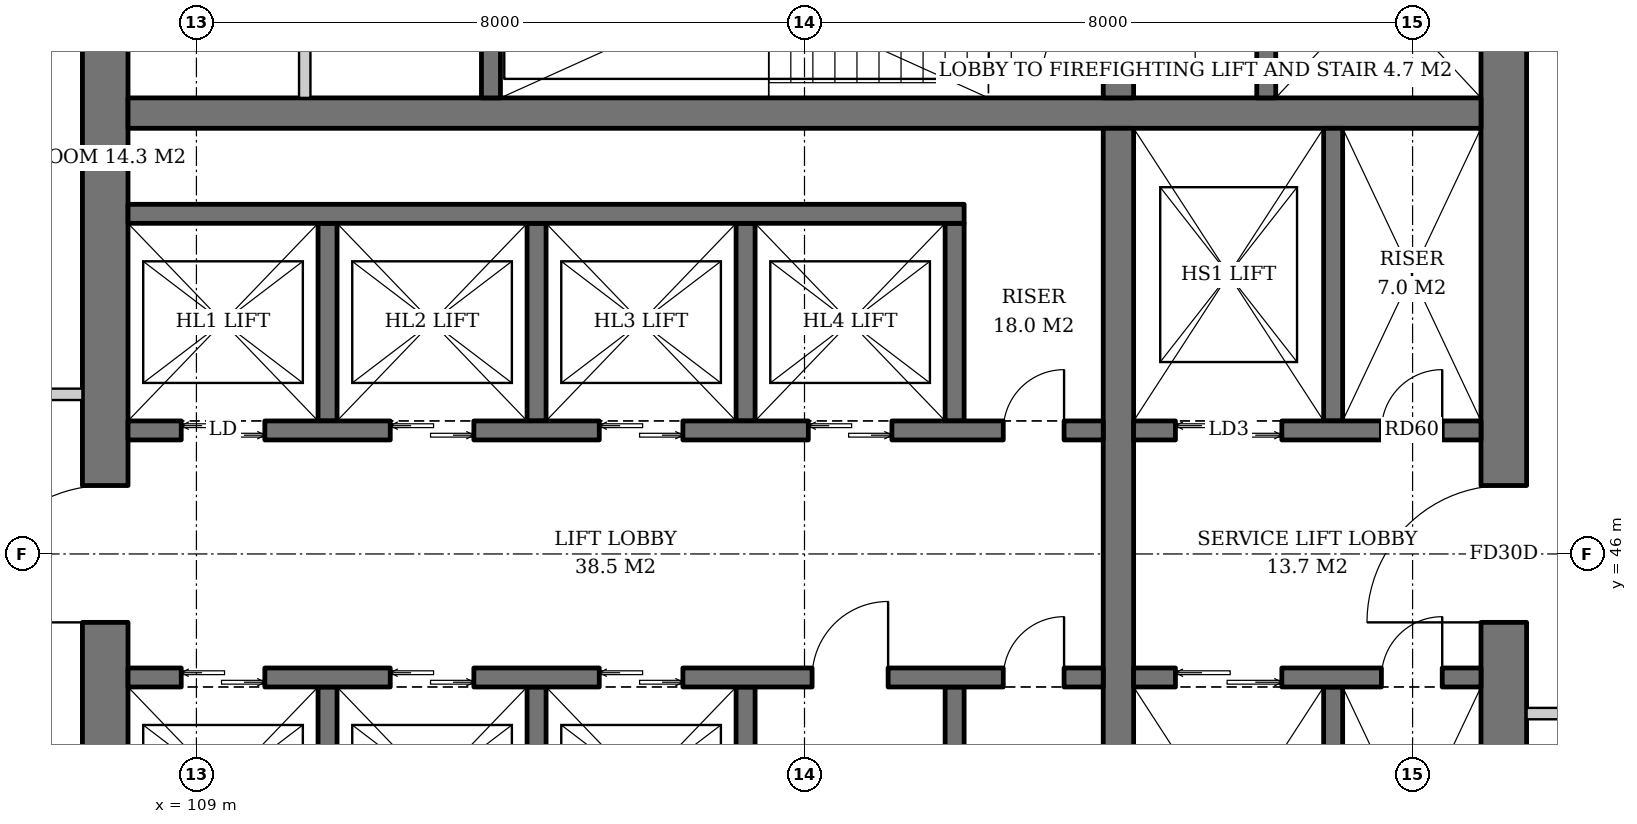
"""IFC4 building model, lengths in metres.
Left out: names, types, materials, properties, quantities, classifications, styles, units other than length and angle.
Written with IfcOpenShell. Run it as: python <this file> out.ifc"""

import sys

from ifc_helpers import new_model, si_unit, direction, frame, frame_2d, origin, place, context, subcontext, project, spatial, rectangle, extrude, element, fill, save


model = new_model("IFC4")
c1 = context("Model", 3, precision=1e-05, world=origin(), true_north=direction((0.0, 1.0)))
c2 = subcontext(c1, "Body", "Model", "MODEL_VIEW")
j1 = project(units=[si_unit("LENGTHUNIT", "METRE"), si_unit("PLANEANGLEUNIT", "RADIAN")], contexts=[c1])
p1 = place(None, origin())
s1 = spatial("IfcSite", under=j1, at=p1, CompositionType="ELEMENT")
p2 = place(p1, origin())
s2 = spatial("IfcBuilding", under=s1, at=p2, CompositionType="ELEMENT")
p3 = place(p2, frame((0.0, 0.0, 40.0)))
s3 = spatial("IfcBuildingStorey", under=s2, at=p3, CompositionType="ELEMENT", Elevation=40.0)
p4 = place(p3, frame((107.8, 37.1, 0.0), z_axis=(0.0, 0.0, 1.0), x_axis=(0.0, 1.0, 0.0)))
e1 = element("IfcWall", 1, at=p4, inside=s3, PredefinedType="SHEAR", context=c2, shape_type="SweptSolid", body=[
    extrude(rectangle(XDim=17.8, YDim=0.6, at=frame_2d((8.9, 0.0))), origin(), (0.0, 0.0, 1.0), 3.8),
])
p5 = place(p4, frame((8.0, 0.0, 0.0)))
e2 = element("IfcOpeningElement", 2, at=p5, cuts=e1, PredefinedType="OPENING", context=c2, shape_type="SweptSolid", body=[
    extrude(rectangle(XDim=1.8, YDim=2.4, at=frame_2d((0.9, 1.2))), frame((0.0, 0.31, 0.0), z_axis=(0.0, -1.0, 0.0), x_axis=(1.0, 0.0, 0.0)), (0.0, 0.0, 1.0), 0.62),
])
p6 = place(p3, frame((126.2, 37.1, 0.0), z_axis=(0.0, 0.0, 1.0), x_axis=(0.0, 1.0, 0.0)))
e3 = element("IfcWall", 3, at=p6, inside=s3, PredefinedType="SHEAR", context=c2, shape_type="SweptSolid", body=[
    extrude(rectangle(XDim=17.8, YDim=0.6, at=frame_2d((8.9, 0.0))), origin(), (0.0, 0.0, 1.0), 3.8),
])
p7 = place(p6, frame((8.0, 0.0, 0.0)))
e4 = element("IfcOpeningElement", 4, at=p7, cuts=e3, PredefinedType="OPENING", context=c2, shape_type="SweptSolid", body=[
    extrude(rectangle(XDim=1.8, YDim=2.4, at=frame_2d((0.9, 1.2))), frame((0.0, 0.31, 0.0), z_axis=(0.0, -1.0, 0.0), x_axis=(1.0, 0.0, 0.0)), (0.0, 0.0, 1.0), 0.62),
])
p8 = place(p3, frame((108.1, 51.8, 0.0), z_axis=(0.0, 0.0, 1.0), x_axis=(1.0, 0.0, 0.0)))
e5 = element("IfcWall", 5, at=p8, inside=s3, PredefinedType="SHEAR", context=c2, shape_type="SweptSolid", body=[
    extrude(rectangle(XDim=17.8, YDim=0.4, at=frame_2d((8.9, 0.0))), origin(), (0.0, 0.0, 1.0), 3.8),
])
p9 = place(p3, frame((121.13, 40.4, 0.0), z_axis=(0.0, 0.0, 1.0), x_axis=(0.0, 1.0, 0.0)))
e6 = element("IfcWall", 6, at=p9, inside=s3, PredefinedType="SHEAR", context=c2, shape_type="SweptSolid", body=[
    extrude(rectangle(XDim=11.2, YDim=0.4, at=frame_2d((5.6, 0.0))), origin(), (0.0, 0.0, 1.0), 3.8),
])
p10 = place(p3, frame((121.13, 52.0, 0.0), z_axis=(0.0, 0.0, 1.0), x_axis=(0.0, 1.0, 0.0)))
e7 = element("IfcWall", 7, at=p10, inside=s3, PredefinedType="SHEAR", context=c2, shape_type="SweptSolid", body=[
    extrude(rectangle(XDim=2.9, YDim=0.4, at=frame_2d((1.45, 0.0))), origin(), (0.0, 0.0, 1.0), 3.8),
])
p11 = place(p10, frame((0.3, 0.0, 0.0)))
e8 = element("IfcOpeningElement", 8, at=p11, cuts=e7, PredefinedType="OPENING", context=c2, shape_type="SweptSolid", body=[
    extrude(rectangle(XDim=1.0, YDim=2.1, at=frame_2d((0.5, 1.05))), frame((0.0, 0.21, 0.0), z_axis=(0.0, -1.0, 0.0), x_axis=(1.0, 0.0, 0.0)), (0.0, 0.0, 1.0), 0.42),
])
p12 = place(p3, frame((112.875, 52.0, 0.0), z_axis=(0.0, 0.0, 1.0), x_axis=(0.0, 1.0, 0.0)))
e9 = element("IfcWall", 9, at=p12, inside=s3, PredefinedType="SHEAR", context=c2, shape_type="SweptSolid", body=[
    extrude(rectangle(XDim=2.9, YDim=0.25, at=frame_2d((1.45, 0.0))), origin(), (0.0, 0.0, 1.0), 3.8),
])
p13 = place(p3, frame((123.075, 52.0, 0.0), z_axis=(0.0, 0.0, 1.0), x_axis=(0.0, 1.0, 0.0)))
e10 = element("IfcWall", 10, at=p13, inside=s3, PredefinedType="SHEAR", context=c2, shape_type="SweptSolid", body=[
    extrude(rectangle(XDim=2.9, YDim=0.25, at=frame_2d((1.45, 0.0))), origin(), (0.0, 0.0, 1.0), 3.8),
])
p14 = place(p13, frame((0.8, 0.0, 0.0)))
e11 = element("IfcOpeningElement", 11, at=p14, cuts=e10, PredefinedType="OPENING", context=c2, shape_type="SweptSolid", body=[
    extrude(rectangle(XDim=1.3, YDim=2.2, at=frame_2d((0.65, 1.1))), frame((0.0, 0.135, 0.0), z_axis=(0.0, -1.0, 0.0), x_axis=(1.0, 0.0, 0.0)), (0.0, 0.0, 1.0), 0.27),
])
for number, where, z_axis, x_axis in (
    (12, (110.725, 47.75, 0.0), (0.0, 0.0, 1.0), (0.0, 1.0, 0.0)),
    (13, (113.475, 47.75, 0.0), (0.0, 0.0, 1.0), (0.0, 1.0, 0.0)),
    (14, (116.225, 47.75, 0.0), (0.0, 0.0, 1.0), (0.0, 1.0, 0.0)),
    (15, (118.975, 47.75, 0.0), (0.0, 0.0, 1.0), (0.0, 1.0, 0.0)),
):
    element("IfcWall", number, at=place(p3, frame(where, z_axis=z_axis, x_axis=x_axis)), inside=s3, PredefinedType="SHEAR", context=c2, shape_type="SweptSolid", body=[
        extrude(rectangle(XDim=2.6, YDim=0.25, at=frame_2d((1.3, 0.0))), origin(), (0.0, 0.0, 1.0), 3.8),
    ])
p15 = place(p3, frame((108.1, 50.475, 0.0), z_axis=(0.0, 0.0, 1.0), x_axis=(1.0, 0.0, 0.0)))
e16 = element("IfcWall", 16, at=p15, inside=s3, PredefinedType="SHEAR", context=c2, shape_type="SweptSolid", body=[
    extrude(rectangle(XDim=11.0, YDim=0.25, at=frame_2d((5.5, 0.0))), origin(), (0.0, 0.0, 1.0), 3.8),
])
p16 = place(p3, frame((108.1, 47.625, 0.0), z_axis=(0.0, 0.0, 1.0), x_axis=(1.0, 0.0, 0.0)))
e17 = element("IfcWall", 17, at=p16, inside=s3, PredefinedType="SHEAR", context=c2, shape_type="SweptSolid", body=[
    extrude(rectangle(XDim=12.83, YDim=0.25, at=frame_2d((6.415, 0.0))), origin(), (0.0, 0.0, 1.0), 3.8),
])
p17 = place(p16, frame((0.7, 0.0, 0.0)))
e18 = element("IfcOpeningElement", 18, at=p17, cuts=e17, PredefinedType="OPENING", context=c2, shape_type="SweptSolid", body=[
    extrude(rectangle(XDim=1.1, YDim=2.2, at=frame_2d((0.55, 1.1))), frame((0.0, 0.135, 0.0), z_axis=(0.0, -1.0, 0.0), x_axis=(1.0, 0.0, 0.0)), (0.0, 0.0, 1.0), 0.27),
])
p18 = place(p16, frame((3.45, 0.0, 0.0)))
e19 = element("IfcOpeningElement", 19, at=p18, cuts=e17, PredefinedType="OPENING", context=c2, shape_type="SweptSolid", body=[
    extrude(rectangle(XDim=1.1, YDim=2.2, at=frame_2d((0.55, 1.1))), frame((0.0, 0.135, 0.0), z_axis=(0.0, -1.0, 0.0), x_axis=(1.0, 0.0, 0.0)), (0.0, 0.0, 1.0), 0.27),
])
p19 = place(p16, frame((6.2, 0.0, 0.0)))
e20 = element("IfcOpeningElement", 20, at=p19, cuts=e17, PredefinedType="OPENING", context=c2, shape_type="SweptSolid", body=[
    extrude(rectangle(XDim=1.1, YDim=2.2, at=frame_2d((0.55, 1.1))), frame((0.0, 0.135, 0.0), z_axis=(0.0, -1.0, 0.0), x_axis=(1.0, 0.0, 0.0)), (0.0, 0.0, 1.0), 0.27),
])
p20 = place(p16, frame((8.95, 0.0, 0.0)))
e21 = element("IfcOpeningElement", 21, at=p20, cuts=e17, PredefinedType="OPENING", context=c2, shape_type="SweptSolid", body=[
    extrude(rectangle(XDim=1.1, YDim=2.2, at=frame_2d((0.55, 1.1))), frame((0.0, 0.135, 0.0), z_axis=(0.0, -1.0, 0.0), x_axis=(1.0, 0.0, 0.0)), (0.0, 0.0, 1.0), 0.27),
])
p21 = place(p16, frame((11.515, 0.0, 0.0)))
e22 = element("IfcOpeningElement", 22, at=p21, cuts=e17, PredefinedType="OPENING", context=c2, shape_type="SweptSolid", body=[
    extrude(rectangle(XDim=0.8, YDim=2.0, at=frame_2d((0.4, 1.0))), frame((0.0, 0.135, 0.0), z_axis=(0.0, -1.0, 0.0), x_axis=(1.0, 0.0, 0.0)), (0.0, 0.0, 1.0), 0.27),
])
for number, where, z_axis, x_axis in (
    (23, (110.725, 44.25, 0.0), (0.0, 0.0, 1.0), (0.0, -1.0, 0.0)),
    (24, (113.475, 44.25, 0.0), (0.0, 0.0, 1.0), (0.0, -1.0, 0.0)),
    (25, (116.225, 44.25, 0.0), (0.0, 0.0, 1.0), (0.0, -1.0, 0.0)),
    (26, (118.975, 44.25, 0.0), (0.0, 0.0, 1.0), (0.0, -1.0, 0.0)),
):
    element("IfcWall", number, at=place(p3, frame(where, z_axis=z_axis, x_axis=x_axis)), inside=s3, PredefinedType="SHEAR", context=c2, shape_type="SweptSolid", body=[
        extrude(rectangle(XDim=2.6, YDim=0.25, at=frame_2d((1.3, 0.0))), origin(), (0.0, 0.0, 1.0), 3.8),
    ])
p22 = place(p3, frame((108.1, 44.375, 0.0), z_axis=(0.0, 0.0, 1.0), x_axis=(1.0, 0.0, 0.0)))
e27 = element("IfcWall", 27, at=p22, inside=s3, PredefinedType="SHEAR", context=c2, shape_type="SweptSolid", body=[
    extrude(rectangle(XDim=12.83, YDim=0.25, at=frame_2d((6.415, 0.0))), origin(), (0.0, 0.0, 1.0), 3.8),
])
p23 = place(p22, frame((0.7, 0.0, 0.0)))
e28 = element("IfcOpeningElement", 28, at=p23, cuts=e27, PredefinedType="OPENING", context=c2, shape_type="SweptSolid", body=[
    extrude(rectangle(XDim=1.1, YDim=2.2, at=frame_2d((0.55, 1.1))), frame((0.0, 0.135, 0.0), z_axis=(0.0, -1.0, 0.0), x_axis=(1.0, 0.0, 0.0)), (0.0, 0.0, 1.0), 0.27),
])
p24 = place(p22, frame((3.45, 0.0, 0.0)))
e29 = element("IfcOpeningElement", 29, at=p24, cuts=e27, PredefinedType="OPENING", context=c2, shape_type="SweptSolid", body=[
    extrude(rectangle(XDim=1.1, YDim=2.2, at=frame_2d((0.55, 1.1))), frame((0.0, 0.135, 0.0), z_axis=(0.0, -1.0, 0.0), x_axis=(1.0, 0.0, 0.0)), (0.0, 0.0, 1.0), 0.27),
])
p25 = place(p22, frame((6.2, 0.0, 0.0)))
e30 = element("IfcOpeningElement", 30, at=p25, cuts=e27, PredefinedType="OPENING", context=c2, shape_type="SweptSolid", body=[
    extrude(rectangle(XDim=1.1, YDim=2.2, at=frame_2d((0.55, 1.1))), frame((0.0, 0.135, 0.0), z_axis=(0.0, -1.0, 0.0), x_axis=(1.0, 0.0, 0.0)), (0.0, 0.0, 1.0), 0.27),
])
p26 = place(p22, frame((9.0, 0.0, 0.0)))
e31 = element("IfcOpeningElement", 31, at=p26, cuts=e27, PredefinedType="OPENING", context=c2, shape_type="SweptSolid", body=[
    extrude(rectangle(XDim=1.0, YDim=2.1, at=frame_2d((0.5, 1.05))), frame((0.0, 0.135, 0.0), z_axis=(0.0, -1.0, 0.0), x_axis=(1.0, 0.0, 0.0)), (0.0, 0.0, 1.0), 0.27),
])
p27 = place(p22, frame((11.515, 0.0, 0.0)))
e32 = element("IfcOpeningElement", 32, at=p27, cuts=e27, PredefinedType="OPENING", context=c2, shape_type="SweptSolid", body=[
    extrude(rectangle(XDim=0.8, YDim=2.0, at=frame_2d((0.4, 1.0))), frame((0.0, 0.135, 0.0), z_axis=(0.0, -1.0, 0.0), x_axis=(1.0, 0.0, 0.0)), (0.0, 0.0, 1.0), 0.27),
])
p28 = place(p3, frame((123.955, 47.75, 0.0), z_axis=(0.0, 0.0, 1.0), x_axis=(0.0, 1.0, 0.0)))
e33 = element("IfcWall", 33, at=p28, inside=s3, PredefinedType="SHEAR", context=c2, shape_type="SweptSolid", body=[
    extrude(rectangle(XDim=3.85, YDim=0.25, at=frame_2d((1.925, 0.0))), origin(), (0.0, 0.0, 1.0), 3.8),
])
p29 = place(p3, frame((121.33, 47.625, 0.0), z_axis=(0.0, 0.0, 1.0), x_axis=(1.0, 0.0, 0.0)))
e34 = element("IfcWall", 34, at=p29, inside=s3, PredefinedType="SHEAR", context=c2, shape_type="SweptSolid", body=[
    extrude(rectangle(XDim=4.57, YDim=0.25, at=frame_2d((2.285, 0.0))), origin(), (0.0, 0.0, 1.0), 3.8),
])
p30 = place(p29, frame((0.55, 0.0, 0.0)))
e35 = element("IfcOpeningElement", 35, at=p30, cuts=e34, PredefinedType="OPENING", context=c2, shape_type="SweptSolid", body=[
    extrude(rectangle(XDim=1.4, YDim=2.4, at=frame_2d((0.7, 1.2))), frame((0.0, 0.135, 0.0), z_axis=(0.0, -1.0, 0.0), x_axis=(1.0, 0.0, 0.0)), (0.0, 0.0, 1.0), 0.27),
])
p31 = place(p29, frame((3.26, 0.0, 0.0)))
e36 = element("IfcOpeningElement", 36, at=p31, cuts=e34, PredefinedType="OPENING", context=c2, shape_type="SweptSolid", body=[
    extrude(rectangle(XDim=0.8, YDim=2.0, at=frame_2d((0.4, 1.0))), frame((0.0, 0.135, 0.0), z_axis=(0.0, -1.0, 0.0), x_axis=(1.0, 0.0, 0.0)), (0.0, 0.0, 1.0), 0.27),
])
p32 = place(p3, frame((123.955, 44.25, 0.0), z_axis=(0.0, 0.0, 1.0), x_axis=(0.0, -1.0, 0.0)))
e37 = element("IfcWall", 37, at=p32, inside=s3, PredefinedType="SHEAR", context=c2, shape_type="SweptSolid", body=[
    extrude(rectangle(XDim=3.85, YDim=0.25, at=frame_2d((1.925, 0.0))), origin(), (0.0, 0.0, 1.0), 3.8),
])
p33 = place(p3, frame((121.33, 44.375, 0.0), z_axis=(0.0, 0.0, 1.0), x_axis=(1.0, 0.0, 0.0)))
e38 = element("IfcWall", 38, at=p33, inside=s3, PredefinedType="SHEAR", context=c2, shape_type="SweptSolid", body=[
    extrude(rectangle(XDim=4.57, YDim=0.25, at=frame_2d((2.285, 0.0))), origin(), (0.0, 0.0, 1.0), 3.8),
])
p34 = place(p33, frame((0.55, 0.0, 0.0)))
e39 = element("IfcOpeningElement", 39, at=p34, cuts=e38, PredefinedType="OPENING", context=c2, shape_type="SweptSolid", body=[
    extrude(rectangle(XDim=1.4, YDim=2.4, at=frame_2d((0.7, 1.2))), frame((0.0, 0.135, 0.0), z_axis=(0.0, -1.0, 0.0), x_axis=(1.0, 0.0, 0.0)), (0.0, 0.0, 1.0), 0.27),
])
p35 = place(p33, frame((3.26, 0.0, 0.0)))
e40 = element("IfcOpeningElement", 40, at=p35, cuts=e38, PredefinedType="OPENING", context=c2, shape_type="SweptSolid", body=[
    extrude(rectangle(XDim=0.8, YDim=2.0, at=frame_2d((0.4, 1.0))), frame((0.0, 0.135, 0.0), z_axis=(0.0, -1.0, 0.0), x_axis=(1.0, 0.0, 0.0)), (0.0, 0.0, 1.0), 0.27),
])
p36 = place(p3, frame((110.425, 52.0, 0.0), z_axis=(0.0, 0.0, 1.0), x_axis=(0.0, 1.0, 0.0)))
e41 = element("IfcWall", 41, at=p36, inside=s3, PredefinedType="SOLIDWALL", context=c2, shape_type="SweptSolid", body=[
    extrude(rectangle(XDim=2.9, YDim=0.15, at=frame_2d((1.45, 0.0))), origin(), (0.0, 0.0, 1.0), 3.6),
])
for number, where, z_axis, x_axis in (
    (42, (126.5, 43.9, 0.0), (0.0, 0.0, 1.0), (1.0, 0.0, 0.0)),
    (43, (107.5, 48.1, 0.0), (0.0, 0.0, 1.0), (-1.0, 0.0, 0.0)),
):
    element("IfcWall", number, at=place(p3, frame(where, z_axis=z_axis, x_axis=x_axis)), inside=s3, PredefinedType="PARTITIONING", context=c2, shape_type="SweptSolid", body=[
        extrude(rectangle(XDim=1.875, YDim=0.15, at=frame_2d((0.938, 0.0))), origin(), (0.0, 0.0, 1.0), 3.6),
    ])
p37 = place(p17, origin())
e44 = element("IfcDoor", 44, at=p37, inside=s3, OperationType="DOUBLE_DOOR_SLIDING", PredefinedType="DOOR", context=c2, shape_type="SweptSolid", body=[
    extrude(rectangle(XDim=1.1, YDim=2.2, at=frame_2d((0.55, 1.1))), frame((0.0, 0.025, 0.0), z_axis=(0.0, -1.0, 0.0), x_axis=(1.0, 0.0, 0.0)), (0.0, 0.0, 1.0), 0.05),
])
fill(e18, e44)
p38 = place(p18, origin())
e45 = element("IfcDoor", 45, at=p38, inside=s3, OperationType="DOUBLE_DOOR_SLIDING", PredefinedType="DOOR", context=c2, shape_type="SweptSolid", body=[
    extrude(rectangle(XDim=1.1, YDim=2.2, at=frame_2d((0.55, 1.1))), frame((0.0, 0.025, 0.0), z_axis=(0.0, -1.0, 0.0), x_axis=(1.0, 0.0, 0.0)), (0.0, 0.0, 1.0), 0.05),
])
fill(e19, e45)
p39 = place(p19, origin())
e46 = element("IfcDoor", 46, at=p39, inside=s3, OperationType="DOUBLE_DOOR_SLIDING", PredefinedType="DOOR", context=c2, shape_type="SweptSolid", body=[
    extrude(rectangle(XDim=1.1, YDim=2.2, at=frame_2d((0.55, 1.1))), frame((0.0, 0.025, 0.0), z_axis=(0.0, -1.0, 0.0), x_axis=(1.0, 0.0, 0.0)), (0.0, 0.0, 1.0), 0.05),
])
fill(e20, e46)
p40 = place(p20, origin())
e47 = element("IfcDoor", 47, at=p40, inside=s3, OperationType="DOUBLE_DOOR_SLIDING", PredefinedType="DOOR", context=c2, shape_type="SweptSolid", body=[
    extrude(rectangle(XDim=1.1, YDim=2.2, at=frame_2d((0.55, 1.1))), frame((0.0, 0.025, 0.0), z_axis=(0.0, -1.0, 0.0), x_axis=(1.0, 0.0, 0.0)), (0.0, 0.0, 1.0), 0.05),
])
fill(e21, e47)
p41 = place(p21, origin())
e48 = element("IfcDoor", 48, at=p41, inside=s3, OperationType="SINGLE_SWING_RIGHT", PredefinedType="DOOR", context=c2, shape_type="SweptSolid", body=[
    extrude(rectangle(XDim=0.8, YDim=2.0, at=frame_2d((0.4, 1.0))), frame((0.0, 0.025, 0.0), z_axis=(0.0, -1.0, 0.0), x_axis=(1.0, 0.0, 0.0)), (0.0, 0.0, 1.0), 0.05),
])
fill(e22, e48)
p42 = place(p23, origin())
e49 = element("IfcDoor", 49, at=p42, inside=s3, OperationType="DOUBLE_DOOR_SLIDING", PredefinedType="DOOR", context=c2, shape_type="SweptSolid", body=[
    extrude(rectangle(XDim=1.1, YDim=2.2, at=frame_2d((0.55, 1.1))), frame((0.0, 0.025, 0.0), z_axis=(0.0, -1.0, 0.0), x_axis=(1.0, 0.0, 0.0)), (0.0, 0.0, 1.0), 0.05),
])
fill(e28, e49)
p43 = place(p24, origin())
e50 = element("IfcDoor", 50, at=p43, inside=s3, OperationType="DOUBLE_DOOR_SLIDING", PredefinedType="DOOR", context=c2, shape_type="SweptSolid", body=[
    extrude(rectangle(XDim=1.1, YDim=2.2, at=frame_2d((0.55, 1.1))), frame((0.0, 0.025, 0.0), z_axis=(0.0, -1.0, 0.0), x_axis=(1.0, 0.0, 0.0)), (0.0, 0.0, 1.0), 0.05),
])
fill(e29, e50)
p44 = place(p25, origin())
e51 = element("IfcDoor", 51, at=p44, inside=s3, OperationType="DOUBLE_DOOR_SLIDING", PredefinedType="DOOR", context=c2, shape_type="SweptSolid", body=[
    extrude(rectangle(XDim=1.1, YDim=2.2, at=frame_2d((0.55, 1.1))), frame((0.0, 0.025, 0.0), z_axis=(0.0, -1.0, 0.0), x_axis=(1.0, 0.0, 0.0)), (0.0, 0.0, 1.0), 0.05),
])
fill(e30, e51)
p45 = place(p26, origin())
e52 = element("IfcDoor", 52, at=p45, inside=s3, OperationType="SINGLE_SWING_RIGHT", PredefinedType="DOOR", context=c2, shape_type="SweptSolid", body=[
    extrude(rectangle(XDim=1.0, YDim=2.1, at=frame_2d((0.5, 1.05))), frame((0.0, 0.025, 0.0), z_axis=(0.0, -1.0, 0.0), x_axis=(1.0, 0.0, 0.0)), (0.0, 0.0, 1.0), 0.05),
])
fill(e31, e52)
p46 = place(p27, origin())
e53 = element("IfcDoor", 53, at=p46, inside=s3, OperationType="SINGLE_SWING_RIGHT", PredefinedType="DOOR", context=c2, shape_type="SweptSolid", body=[
    extrude(rectangle(XDim=0.8, YDim=2.0, at=frame_2d((0.4, 1.0))), frame((0.0, 0.025, 0.0), z_axis=(0.0, -1.0, 0.0), x_axis=(1.0, 0.0, 0.0)), (0.0, 0.0, 1.0), 0.05),
])
fill(e32, e53)
p47 = place(p30, origin())
e54 = element("IfcDoor", 54, at=p47, inside=s3, OperationType="DOUBLE_DOOR_SLIDING", PredefinedType="DOOR", context=c2, shape_type="SweptSolid", body=[
    extrude(rectangle(XDim=1.4, YDim=2.4, at=frame_2d((0.7, 1.2))), frame((0.0, 0.025, 0.0), z_axis=(0.0, -1.0, 0.0), x_axis=(1.0, 0.0, 0.0)), (0.0, 0.0, 1.0), 0.05),
])
fill(e35, e54)
p48 = place(p31, origin())
e55 = element("IfcDoor", 55, at=p48, inside=s3, OperationType="SINGLE_SWING_RIGHT", PredefinedType="DOOR", context=c2, shape_type="SweptSolid", body=[
    extrude(rectangle(XDim=0.8, YDim=2.0, at=frame_2d((0.4, 1.0))), frame((0.0, 0.025, 0.0), z_axis=(0.0, -1.0, 0.0), x_axis=(1.0, 0.0, 0.0)), (0.0, 0.0, 1.0), 0.05),
])
fill(e36, e55)
p49 = place(p34, origin())
e56 = element("IfcDoor", 56, at=p49, inside=s3, OperationType="DOUBLE_DOOR_SLIDING", PredefinedType="DOOR", context=c2, shape_type="SweptSolid", body=[
    extrude(rectangle(XDim=1.4, YDim=2.4, at=frame_2d((0.7, 1.2))), frame((0.0, 0.025, 0.0), z_axis=(0.0, -1.0, 0.0), x_axis=(1.0, 0.0, 0.0)), (0.0, 0.0, 1.0), 0.05),
])
fill(e39, e56)
p50 = place(p35, origin())
e57 = element("IfcDoor", 57, at=p50, inside=s3, OperationType="SINGLE_SWING_RIGHT", PredefinedType="DOOR", context=c2, shape_type="SweptSolid", body=[
    extrude(rectangle(XDim=0.8, YDim=2.0, at=frame_2d((0.4, 1.0))), frame((0.0, 0.025, 0.0), z_axis=(0.0, -1.0, 0.0), x_axis=(1.0, 0.0, 0.0)), (0.0, 0.0, 1.0), 0.05),
])
fill(e40, e57)
p51 = place(p11, origin())
e58 = element("IfcDoor", 58, at=p51, inside=s3, OperationType="SINGLE_SWING_LEFT", PredefinedType="DOOR", context=c2, shape_type="SweptSolid", body=[
    extrude(rectangle(XDim=1.0, YDim=2.1, at=frame_2d((0.5, 1.05))), frame((0.0, 0.025, 0.0), z_axis=(0.0, -1.0, 0.0), x_axis=(1.0, 0.0, 0.0)), (0.0, 0.0, 1.0), 0.05),
])
fill(e8, e58)
p52 = place(p5, origin())
e59 = element("IfcDoor", 59, at=p52, inside=s3, OperationType="DOUBLE_DOOR_SINGLE_SWING", PredefinedType="DOOR", context=c2, shape_type="SweptSolid", body=[
    extrude(rectangle(XDim=1.8, YDim=2.4, at=frame_2d((0.9, 1.2))), frame((0.0, 0.025, 0.0), z_axis=(0.0, -1.0, 0.0), x_axis=(1.0, 0.0, 0.0)), (0.0, 0.0, 1.0), 0.05),
])
fill(e2, e59)
p53 = place(p7, origin())
e60 = element("IfcDoor", 60, at=p53, inside=s3, OperationType="DOUBLE_DOOR_SINGLE_SWING", PredefinedType="DOOR", context=c2, shape_type="SweptSolid", body=[
    extrude(rectangle(XDim=1.8, YDim=2.4, at=frame_2d((0.9, 1.2))), frame((0.0, 0.025, 0.0), z_axis=(0.0, -1.0, 0.0), x_axis=(1.0, 0.0, 0.0)), (0.0, 0.0, 1.0), 0.05),
])
fill(e4, e60)
save(model, sys.argv[1])
